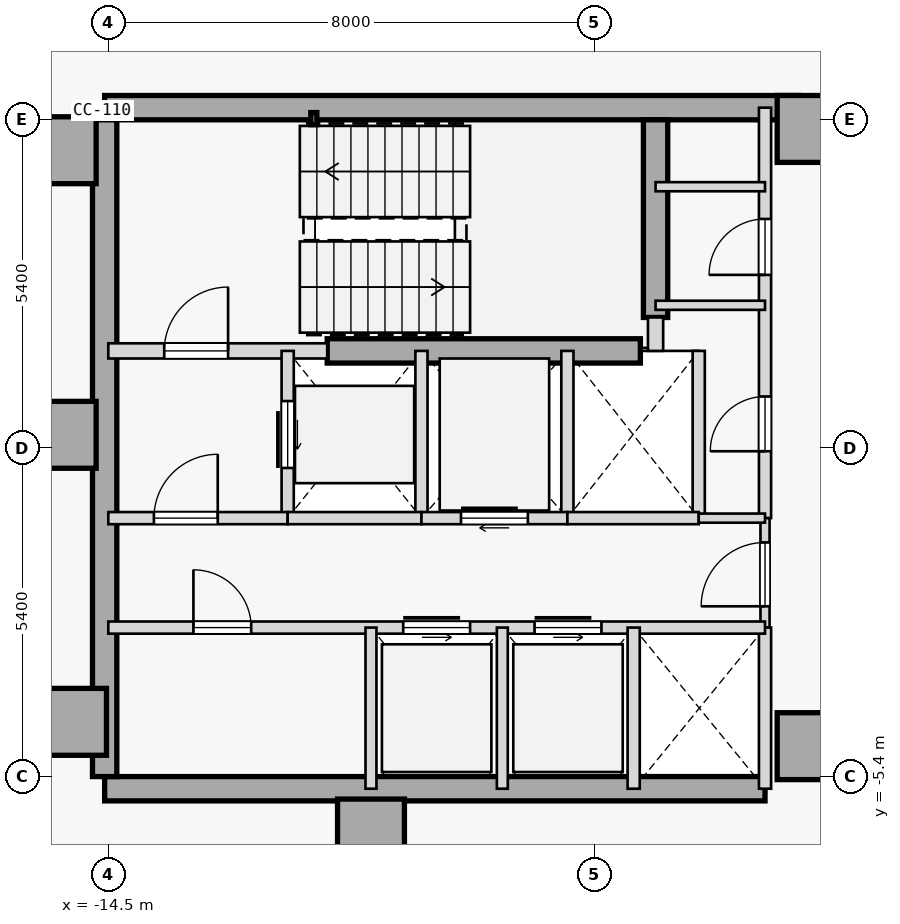
"""IFC4 building model, lengths in metres.
Left out: names, types, materials, properties, quantities, classifications, styles, units other than length and angle.
Written with IfcOpenShell. Run it as: python <this file> out.ifc"""

import sys

from ifc_helpers import new_model, si_unit, direction, frame, frame_2d, origin, origin_2d, place, context, subcontext, project, spatial, rectangle, hollow_rectangle, extrude, element, fill, save


model = new_model("IFC4")
c1 = context("Model", 3, precision=1e-05, world=origin(), true_north=direction((0.0, 1.0)))
c2 = subcontext(c1, "Body", "Model", "MODEL_VIEW")
j1 = project(units=[si_unit("LENGTHUNIT", "METRE"), si_unit("PLANEANGLEUNIT", "RADIAN")], contexts=[c1])
p1 = place(None, origin())
s1 = spatial("IfcSite", under=j1, at=p1, CompositionType="ELEMENT")
p2 = place(p1, origin())
s2 = spatial("IfcBuilding", under=s1, at=p2, CompositionType="ELEMENT")
p3 = place(p2, frame((0.0, 0.0, 128.1)))
s3 = spatial("IfcBuildingStorey", under=s2, at=p3, CompositionType="ELEMENT", Elevation=128.1)
for number, where, z_axis, x_axis in (
    (1, (-15.25, 4.9, 0.0), (0.0, 0.0, 1.0), (1.0, 0.0, 0.0)),
    (2, (-15.25, 0.22, 0.0), (0.0, 0.0, 1.0), (1.0, 0.0, 0.0)),
    (3, (-15.08, -4.5, 0.0), (0.0, 0.0, 1.0), (1.0, 0.0, 0.0)),
    (4, (-10.18, -6.32, 0.0), (0.0, 0.0, 1.0), (1.0, 0.0, 0.0)),
    (5, (-2.95, -4.9, 0.0), (0.0, 0.0, 1.0), (1.0, 0.0, 0.0)),
    (6, (-2.95, 5.25, 0.0), (0.0, 0.0, 1.0), (1.0, 0.0, 0.0)),
):
    element("IfcColumn", number, at=place(p3, frame(where, z_axis=z_axis, x_axis=x_axis)), inside=s3, PredefinedType="COLUMN", context=c2, shape_type="SweptSolid", body=[
        extrude(rectangle(XDim=1.1, YDim=1.1, at=origin_2d()), origin(), (0.0, 0.0, 1.0), 3.7),
    ])
p4 = place(p3, frame((-14.56, 5.6, 0.0), z_axis=(0.0, 0.0, 1.0), x_axis=(1.0, 0.0, 0.0)))
e7 = element("IfcWall", 7, at=p4, inside=s3, PredefinedType="SHEAR", context=c2, shape_type="SweptSolid", body=[
    extrude(rectangle(XDim=11.41, YDim=0.4, at=frame_2d((5.705, 0.0))), origin(), (0.0, 0.0, 1.0), 3.475),
])
p5 = place(p3, frame((-14.56, -5.6, 0.0), z_axis=(0.0, 0.0, 1.0), x_axis=(1.0, 0.0, 0.0)))
e8 = element("IfcWall", 8, at=p5, inside=s3, PredefinedType="SHEAR", context=c2, shape_type="SweptSolid", body=[
    extrude(rectangle(XDim=10.86, YDim=0.4, at=frame_2d((5.43, 0.0))), origin(), (0.0, 0.0, 1.0), 3.475),
])
p6 = place(p3, frame((-14.56, -5.4, 0.0), z_axis=(0.0, 0.0, 1.0), x_axis=(0.0, 1.0, 0.0)))
e9 = element("IfcWall", 9, at=p6, inside=s3, PredefinedType="SHEAR", context=c2, shape_type="SweptSolid", body=[
    extrude(rectangle(XDim=10.8, YDim=0.4, at=frame_2d((5.4, 0.0))), origin(), (0.0, 0.0, 1.0), 3.475),
])
p7 = place(p3, frame((-5.5, 2.15, 0.0), z_axis=(0.0, 0.0, 1.0), x_axis=(0.0, 1.0, 0.0)))
e10 = element("IfcWall", 10, at=p7, inside=s3, PredefinedType="SHEAR", context=c2, shape_type="SweptSolid", body=[
    extrude(rectangle(XDim=3.25, YDim=0.4, at=frame_2d((1.625, 0.0))), origin(), (0.0, 0.0, 1.0), 3.475),
])
p8 = place(p3, frame((-10.9, 1.6, 0.0), z_axis=(0.0, 0.0, 1.0), x_axis=(1.0, 0.0, 0.0)))
e11 = element("IfcWall", 11, at=p8, inside=s3, PredefinedType="SHEAR", context=c2, shape_type="SweptSolid", body=[
    extrude(rectangle(XDim=5.15, YDim=0.4, at=frame_2d((2.575, 0.0))), origin(), (0.0, 0.0, 1.0), 3.475),
])
p9 = place(p3, frame((-11.12, 5.42, 0.0), z_axis=(0.0, 0.0, 1.0), x_axis=(1.0, 0.0, 0.0)))
e12 = element("IfcColumn", 12, at=p9, inside=s3, PredefinedType="COLUMN", context=c2, shape_type="SweptSolid", body=[
    extrude(hollow_rectangle(XDim=0.1, YDim=0.2, WallThickness=0.008, at=origin_2d()), origin(), (0.0, 0.0, 1.0), 3.7),
])
p10 = place(p3, frame((-14.5, 1.6, 0.0), z_axis=(0.0, 0.0, 1.0), x_axis=(1.0, 0.0, 0.0)))
e13 = element("IfcWall", 13, at=p10, inside=s3, PredefinedType="STANDARD", context=c2, shape_type="SweptSolid", body=[
    extrude(rectangle(XDim=3.6, YDim=0.25, at=frame_2d((1.8, 0.0))), origin(), (0.0, 0.0, 1.0), 3.475),
])
p11 = place(p10, frame((0.92, 0.0, 0.0)))
e14 = element("IfcOpeningElement", 14, at=p11, cuts=e13, PredefinedType="OPENING", context=c2, shape_type="SweptSolid", body=[
    extrude(rectangle(XDim=1.05, YDim=2.15, at=frame_2d((0.525, 1.075))), frame((0.0, 0.135, 0.0), z_axis=(0.0, -1.0, 0.0), x_axis=(1.0, 0.0, 0.0)), (0.0, 0.0, 1.0), 0.27),
])
p12 = place(p3, frame((-5.5, 1.6, 0.0), z_axis=(0.0, 0.0, 1.0), x_axis=(0.0, 1.0, 0.0)))
e15 = element("IfcWall", 15, at=p12, inside=s3, PredefinedType="STANDARD", context=c2, shape_type="SweptSolid", body=[
    extrude(rectangle(XDim=0.55, YDim=0.25, at=frame_2d((0.275, 0.0))), origin(), (0.0, 0.0, 1.0), 3.475),
])
p13 = place(p3, frame((-3.7, -1.15, 0.0), z_axis=(0.0, 0.0, 1.0), x_axis=(0.0, 1.0, 0.0)))
e16 = element("IfcWall", 16, at=p13, inside=s3, PredefinedType="STANDARD", context=c2, shape_type="SweptSolid", body=[
    extrude(rectangle(XDim=6.75, YDim=0.2, at=frame_2d((3.375, 0.0))), origin(), (0.0, 0.0, 1.0), 3.475),
])
p14 = place(p13, frame((1.1, 0.0, 0.0)))
e17 = element("IfcOpeningElement", 17, at=p14, cuts=e16, PredefinedType="OPENING", context=c2, shape_type="SweptSolid", body=[
    extrude(rectangle(XDim=0.9, YDim=2.15, at=frame_2d((0.45, 1.075))), frame((0.0, 0.11, 0.0), z_axis=(0.0, -1.0, 0.0), x_axis=(1.0, 0.0, 0.0)), (0.0, 0.0, 1.0), 0.22),
])
p15 = place(p13, frame((4.0, 0.0, 0.0)))
e18 = element("IfcOpeningElement", 18, at=p15, cuts=e16, PredefinedType="OPENING", context=c2, shape_type="SweptSolid", body=[
    extrude(rectangle(XDim=0.92, YDim=2.15, at=frame_2d((0.46, 1.075))), frame((0.0, 0.11, 0.0), z_axis=(0.0, -1.0, 0.0), x_axis=(1.0, 0.0, 0.0)), (0.0, 0.0, 1.0), 0.22),
])
p16 = place(p3, frame((-3.7, -2.95, 0.0), z_axis=(0.0, 0.0, 1.0), x_axis=(0.0, 1.0, 0.0)))
e19 = element("IfcWall", 19, at=p16, inside=s3, PredefinedType="PARTITIONING", context=c2, shape_type="SweptSolid", body=[
    extrude(rectangle(XDim=1.8, YDim=0.15, at=frame_2d((0.9, 0.0))), origin(), (0.0, 0.0, 1.0), 3.475),
])
p17 = place(p16, frame((0.35, 0.0, 0.0)))
e20 = element("IfcOpeningElement", 20, at=p17, cuts=e19, PredefinedType="OPENING", context=c2, shape_type="SweptSolid", body=[
    extrude(rectangle(XDim=1.05, YDim=2.18, at=frame_2d((0.525, 1.09))), frame((0.0, 0.085, 0.0), z_axis=(0.0, -1.0, 0.0), x_axis=(1.0, 0.0, 0.0)), (0.0, 0.0, 1.0), 0.17),
])
p18 = place(p3, frame((-3.7, -5.6, 0.0), z_axis=(0.0, 0.0, 1.0), x_axis=(0.0, 1.0, 0.0)))
e21 = element("IfcWall", 21, at=p18, inside=s3, PredefinedType="STANDARD", context=c2, shape_type="SweptSolid", body=[
    extrude(rectangle(XDim=2.65, YDim=0.2, at=frame_2d((1.325, 0.0))), origin(), (0.0, 0.0, 1.0), 3.475),
])
p19 = place(p3, frame((-11.55, -1.15, 0.0), z_axis=(0.0, 0.0, 1.0), x_axis=(0.0, 1.0, 0.0)))
e22 = element("IfcWall", 22, at=p19, inside=s3, PredefinedType="STANDARD", context=c2, shape_type="SweptSolid", body=[
    extrude(rectangle(XDim=2.75, YDim=0.2, at=frame_2d((1.375, 0.0))), origin(), (0.0, 0.0, 1.0), 3.475),
])
p20 = place(p19, frame((0.825, 0.0, 0.0)))
e23 = element("IfcOpeningElement", 23, at=p20, cuts=e22, PredefinedType="OPENING", context=c2, shape_type="SweptSolid", body=[
    extrude(rectangle(XDim=1.1, YDim=2.15, at=frame_2d((0.55, 1.075))), frame((0.0, 0.11, 0.0), z_axis=(0.0, -1.0, 0.0), x_axis=(1.0, 0.0, 0.0)), (0.0, 0.0, 1.0), 0.22),
])
p21 = place(p3, frame((-9.35, -1.15, 0.0), z_axis=(0.0, 0.0, 1.0), x_axis=(0.0, 1.0, 0.0)))
e24 = element("IfcWall", 24, at=p21, inside=s3, PredefinedType="STANDARD", context=c2, shape_type="SweptSolid", body=[
    extrude(rectangle(XDim=2.75, YDim=0.2, at=frame_2d((1.375, 0.0))), origin(), (0.0, 0.0, 1.0), 3.475),
])
p22 = place(p3, frame((-14.5, -1.15, 0.0), z_axis=(0.0, 0.0, 1.0), x_axis=(1.0, 0.0, 0.0)))
e25 = element("IfcWall", 25, at=p22, inside=s3, PredefinedType="STANDARD", context=c2, shape_type="SweptSolid", body=[
    extrude(rectangle(XDim=2.95, YDim=0.2, at=frame_2d((1.475, 0.0))), origin(), (0.0, 0.0, 1.0), 3.475),
])
p23 = place(p22, frame((0.75, 0.0, 0.0)))
e26 = element("IfcOpeningElement", 26, at=p23, cuts=e25, PredefinedType="OPENING", context=c2, shape_type="SweptSolid", body=[
    extrude(rectangle(XDim=1.05, YDim=2.18, at=frame_2d((0.525, 1.09))), frame((0.0, 0.11, 0.0), z_axis=(0.0, -1.0, 0.0), x_axis=(1.0, 0.0, 0.0)), (0.0, 0.0, 1.0), 0.22),
])
p24 = place(p3, frame((-11.55, -1.15, 0.0), z_axis=(0.0, 0.0, 1.0), x_axis=(1.0, 0.0, 0.0)))
e27 = element("IfcWall", 27, at=p24, inside=s3, PredefinedType="STANDARD", context=c2, shape_type="SweptSolid", body=[
    extrude(rectangle(XDim=2.2, YDim=0.2, at=frame_2d((1.1, 0.0))), origin(), (0.0, 0.0, 1.0), 3.475),
])
p25 = place(p3, frame((-6.95, -1.15, 0.0), z_axis=(0.0, 0.0, 1.0), x_axis=(0.0, 1.0, 0.0)))
e28 = element("IfcWall", 28, at=p25, inside=s3, PredefinedType="STANDARD", context=c2, shape_type="SweptSolid", body=[
    extrude(rectangle(XDim=2.75, YDim=0.2, at=frame_2d((1.375, 0.0))), origin(), (0.0, 0.0, 1.0), 3.475),
])
p26 = place(p3, frame((-9.35, -1.15, 0.0), z_axis=(0.0, 0.0, 1.0), x_axis=(1.0, 0.0, 0.0)))
e29 = element("IfcWall", 29, at=p26, inside=s3, PredefinedType="STANDARD", context=c2, shape_type="SweptSolid", body=[
    extrude(rectangle(XDim=2.4, YDim=0.2, at=frame_2d((1.2, 0.0))), origin(), (0.0, 0.0, 1.0), 3.475),
])
p27 = place(p26, frame((0.65, 0.0, 0.0)))
e30 = element("IfcOpeningElement", 30, at=p27, cuts=e29, PredefinedType="OPENING", context=c2, shape_type="SweptSolid", body=[
    extrude(rectangle(XDim=1.1, YDim=2.15, at=frame_2d((0.55, 1.075))), frame((0.0, 0.11, 0.0), z_axis=(0.0, -1.0, 0.0), x_axis=(1.0, 0.0, 0.0)), (0.0, 0.0, 1.0), 0.22),
])
p28 = place(p3, frame((-4.79, -1.15, 0.0), z_axis=(0.0, 0.0, 1.0), x_axis=(0.0, 1.0, 0.0)))
e31 = element("IfcWall", 31, at=p28, inside=s3, PredefinedType="STANDARD", context=c2, shape_type="SweptSolid", body=[
    extrude(rectangle(XDim=2.75, YDim=0.2, at=frame_2d((1.375, 0.0))), origin(), (0.0, 0.0, 1.0), 3.475),
])
p29 = place(p3, frame((-6.95, -1.15, 0.0), z_axis=(0.0, 0.0, 1.0), x_axis=(1.0, 0.0, 0.0)))
e32 = element("IfcWall", 32, at=p29, inside=s3, PredefinedType="STANDARD", context=c2, shape_type="SweptSolid", body=[
    extrude(rectangle(XDim=2.16, YDim=0.2, at=frame_2d((1.08, 0.0))), origin(), (0.0, 0.0, 1.0), 3.475),
])
p30 = place(p3, frame((-4.79, -1.15, 0.0), z_axis=(0.0, 0.0, 1.0), x_axis=(1.0, 0.0, 0.0)))
e33 = element("IfcWall", 33, at=p30, inside=s3, PredefinedType="PARTITIONING", context=c2, shape_type="SweptSolid", body=[
    extrude(rectangle(XDim=1.09, YDim=0.15, at=frame_2d((0.545, 0.0))), origin(), (0.0, 0.0, 1.0), 3.475),
])
p31 = place(p3, frame((-14.5, -2.95, 0.0), z_axis=(0.0, 0.0, 1.0), x_axis=(1.0, 0.0, 0.0)))
e34 = element("IfcWall", 34, at=p31, inside=s3, PredefinedType="STANDARD", context=c2, shape_type="SweptSolid", body=[
    extrude(rectangle(XDim=10.8, YDim=0.2, at=frame_2d((5.4, 0.0))), origin(), (0.0, 0.0, 1.0), 3.475),
])
p32 = place(p31, frame((4.85, 0.0, 0.0)))
e35 = element("IfcOpeningElement", 35, at=p32, cuts=e34, PredefinedType="OPENING", context=c2, shape_type="SweptSolid", body=[
    extrude(rectangle(XDim=1.1, YDim=2.15, at=frame_2d((0.55, 1.075))), frame((0.0, 0.11, 0.0), z_axis=(0.0, -1.0, 0.0), x_axis=(1.0, 0.0, 0.0)), (0.0, 0.0, 1.0), 0.22),
])
p33 = place(p31, frame((7.01, 0.0, 0.0)))
e36 = element("IfcOpeningElement", 36, at=p33, cuts=e34, PredefinedType="OPENING", context=c2, shape_type="SweptSolid", body=[
    extrude(rectangle(XDim=1.1, YDim=2.15, at=frame_2d((0.55, 1.075))), frame((0.0, 0.11, 0.0), z_axis=(0.0, -1.0, 0.0), x_axis=(1.0, 0.0, 0.0)), (0.0, 0.0, 1.0), 0.22),
])
p34 = place(p31, frame((1.4, 0.0, 0.0)))
e37 = element("IfcOpeningElement", 37, at=p34, cuts=e34, PredefinedType="OPENING", context=c2, shape_type="SweptSolid", body=[
    extrude(rectangle(XDim=0.95, YDim=2.15, at=frame_2d((0.475, 1.075))), frame((0.0, 0.11, 0.0), z_axis=(0.0, -1.0, 0.0), x_axis=(1.0, 0.0, 0.0)), (0.0, 0.0, 1.0), 0.22),
])
p35 = place(p3, frame((-5.86, -5.6, 0.0), z_axis=(0.0, 0.0, 1.0), x_axis=(0.0, 1.0, 0.0)))
e38 = element("IfcWall", 38, at=p35, inside=s3, PredefinedType="STANDARD", context=c2, shape_type="SweptSolid", body=[
    extrude(rectangle(XDim=2.65, YDim=0.2, at=frame_2d((1.325, 0.0))), origin(), (0.0, 0.0, 1.0), 3.475),
])
for number, where, z_axis, x_axis in (
    (39, (-10.18, -5.6, 0.0), (0.0, 0.0, 1.0), (0.0, 1.0, 0.0)),
    (40, (-8.02, -5.6, 0.0), (0.0, 0.0, 1.0), (0.0, 1.0, 0.0)),
):
    element("IfcWall", number, at=place(p3, frame(where, z_axis=z_axis, x_axis=x_axis)), inside=s3, PredefinedType="STANDARD", context=c2, shape_type="SweptSolid", body=[
        extrude(rectangle(XDim=2.65, YDim=0.18, at=frame_2d((1.325, 0.0))), origin(), (0.0, 0.0, 1.0), 3.475),
    ])
for number, where, z_axis, x_axis in (
    (41, (-5.5, 4.3, 0.0), (0.0, 0.0, 1.0), (1.0, 0.0, 0.0)),
    (42, (-5.5, 2.35, 0.0), (0.0, 0.0, 1.0), (1.0, 0.0, 0.0)),
):
    element("IfcWall", number, at=place(p3, frame(where, z_axis=z_axis, x_axis=x_axis)), inside=s3, PredefinedType="PARTITIONING", context=c2, shape_type="SweptSolid", body=[
        extrude(rectangle(XDim=1.8, YDim=0.15, at=frame_2d((0.9, 0.0))), origin(), (0.0, 0.0, 1.0), 3.475),
    ])
p36 = place(p11, origin())
e43 = element("IfcDoor", 43, at=p36, inside=s3, OperationType="SINGLE_SWING_RIGHT", PredefinedType="DOOR", context=c2, shape_type="SweptSolid", body=[
    extrude(rectangle(XDim=1.05, YDim=2.15, at=frame_2d((0.525, 1.075))), frame((0.0, 0.025, 0.0), z_axis=(0.0, -1.0, 0.0), x_axis=(1.0, 0.0, 0.0)), (0.0, 0.0, 1.0), 0.05),
])
fill(e14, e43)
p37 = place(p23, origin())
e44 = element("IfcDoor", 44, at=p37, inside=s3, OperationType="SINGLE_SWING_RIGHT", PredefinedType="DOOR", context=c2, shape_type="SweptSolid", body=[
    extrude(rectangle(XDim=1.05, YDim=2.18, at=frame_2d((0.525, 1.09))), frame((0.0, 0.025, 0.0), z_axis=(0.0, -1.0, 0.0), x_axis=(1.0, 0.0, 0.0)), (0.0, 0.0, 1.0), 0.05),
])
fill(e26, e44)
p38 = place(p17, origin())
e45 = element("IfcDoor", 45, at=p38, inside=s3, OperationType="SINGLE_SWING_LEFT", PredefinedType="DOOR", context=c2, shape_type="SweptSolid", body=[
    extrude(rectangle(XDim=1.05, YDim=2.18, at=frame_2d((0.525, 1.09))), frame((0.0, 0.025, 0.0), z_axis=(0.0, -1.0, 0.0), x_axis=(1.0, 0.0, 0.0)), (0.0, 0.0, 1.0), 0.05),
])
fill(e20, e45)
p39 = place(p20, origin())
e46 = element("IfcDoor", 46, at=p39, inside=s3, OperationType="SLIDING_TO_RIGHT", PredefinedType="DOOR", context=c2, shape_type="SweptSolid", body=[
    extrude(rectangle(XDim=1.1, YDim=2.15, at=frame_2d((0.55, 1.075))), frame((0.0, 0.025, 0.0), z_axis=(0.0, -1.0, 0.0), x_axis=(1.0, 0.0, 0.0)), (0.0, 0.0, 1.0), 0.05),
])
fill(e23, e46)
p40 = place(p27, origin())
e47 = element("IfcDoor", 47, at=p40, inside=s3, OperationType="SLIDING_TO_RIGHT", PredefinedType="DOOR", context=c2, shape_type="SweptSolid", body=[
    extrude(rectangle(XDim=1.1, YDim=2.15, at=frame_2d((0.55, 1.075))), frame((0.0, 0.025, 0.0), z_axis=(0.0, -1.0, 0.0), x_axis=(1.0, 0.0, 0.0)), (0.0, 0.0, 1.0), 0.05),
])
fill(e30, e47)
p41 = place(p32, origin())
e48 = element("IfcDoor", 48, at=p41, inside=s3, OperationType="SLIDING_TO_LEFT", PredefinedType="DOOR", context=c2, shape_type="SweptSolid", body=[
    extrude(rectangle(XDim=1.1, YDim=2.15, at=frame_2d((0.55, 1.075))), frame((0.0, 0.025, 0.0), z_axis=(0.0, -1.0, 0.0), x_axis=(1.0, 0.0, 0.0)), (0.0, 0.0, 1.0), 0.05),
])
fill(e35, e48)
p42 = place(p33, origin())
e49 = element("IfcDoor", 49, at=p42, inside=s3, OperationType="SLIDING_TO_LEFT", PredefinedType="DOOR", context=c2, shape_type="SweptSolid", body=[
    extrude(rectangle(XDim=1.1, YDim=2.15, at=frame_2d((0.55, 1.075))), frame((0.0, 0.025, 0.0), z_axis=(0.0, -1.0, 0.0), x_axis=(1.0, 0.0, 0.0)), (0.0, 0.0, 1.0), 0.05),
])
fill(e36, e49)
p43 = place(p34, origin())
e50 = element("IfcDoor", 50, at=p43, inside=s3, OperationType="SINGLE_SWING_LEFT", PredefinedType="DOOR", context=c2, shape_type="SweptSolid", body=[
    extrude(rectangle(XDim=0.95, YDim=2.15, at=frame_2d((0.475, 1.075))), frame((0.0, 0.025, 0.0), z_axis=(0.0, -1.0, 0.0), x_axis=(1.0, 0.0, 0.0)), (0.0, 0.0, 1.0), 0.05),
])
fill(e37, e50)
p44 = place(p14, origin())
e51 = element("IfcDoor", 51, at=p44, inside=s3, OperationType="SINGLE_SWING_LEFT", PredefinedType="DOOR", context=c2, shape_type="SweptSolid", body=[
    extrude(rectangle(XDim=0.9, YDim=2.15, at=frame_2d((0.45, 1.075))), frame((0.0, 0.025, 0.0), z_axis=(0.0, -1.0, 0.0), x_axis=(1.0, 0.0, 0.0)), (0.0, 0.0, 1.0), 0.05),
])
fill(e17, e51)
p45 = place(p15, origin())
e52 = element("IfcDoor", 52, at=p45, inside=s3, OperationType="SINGLE_SWING_LEFT", PredefinedType="DOOR", context=c2, shape_type="SweptSolid", body=[
    extrude(rectangle(XDim=0.92, YDim=2.15, at=frame_2d((0.46, 1.075))), frame((0.0, 0.025, 0.0), z_axis=(0.0, -1.0, 0.0), x_axis=(1.0, 0.0, 0.0)), (0.0, 0.0, 1.0), 0.05),
])
fill(e18, e52)
save(model, sys.argv[1])
